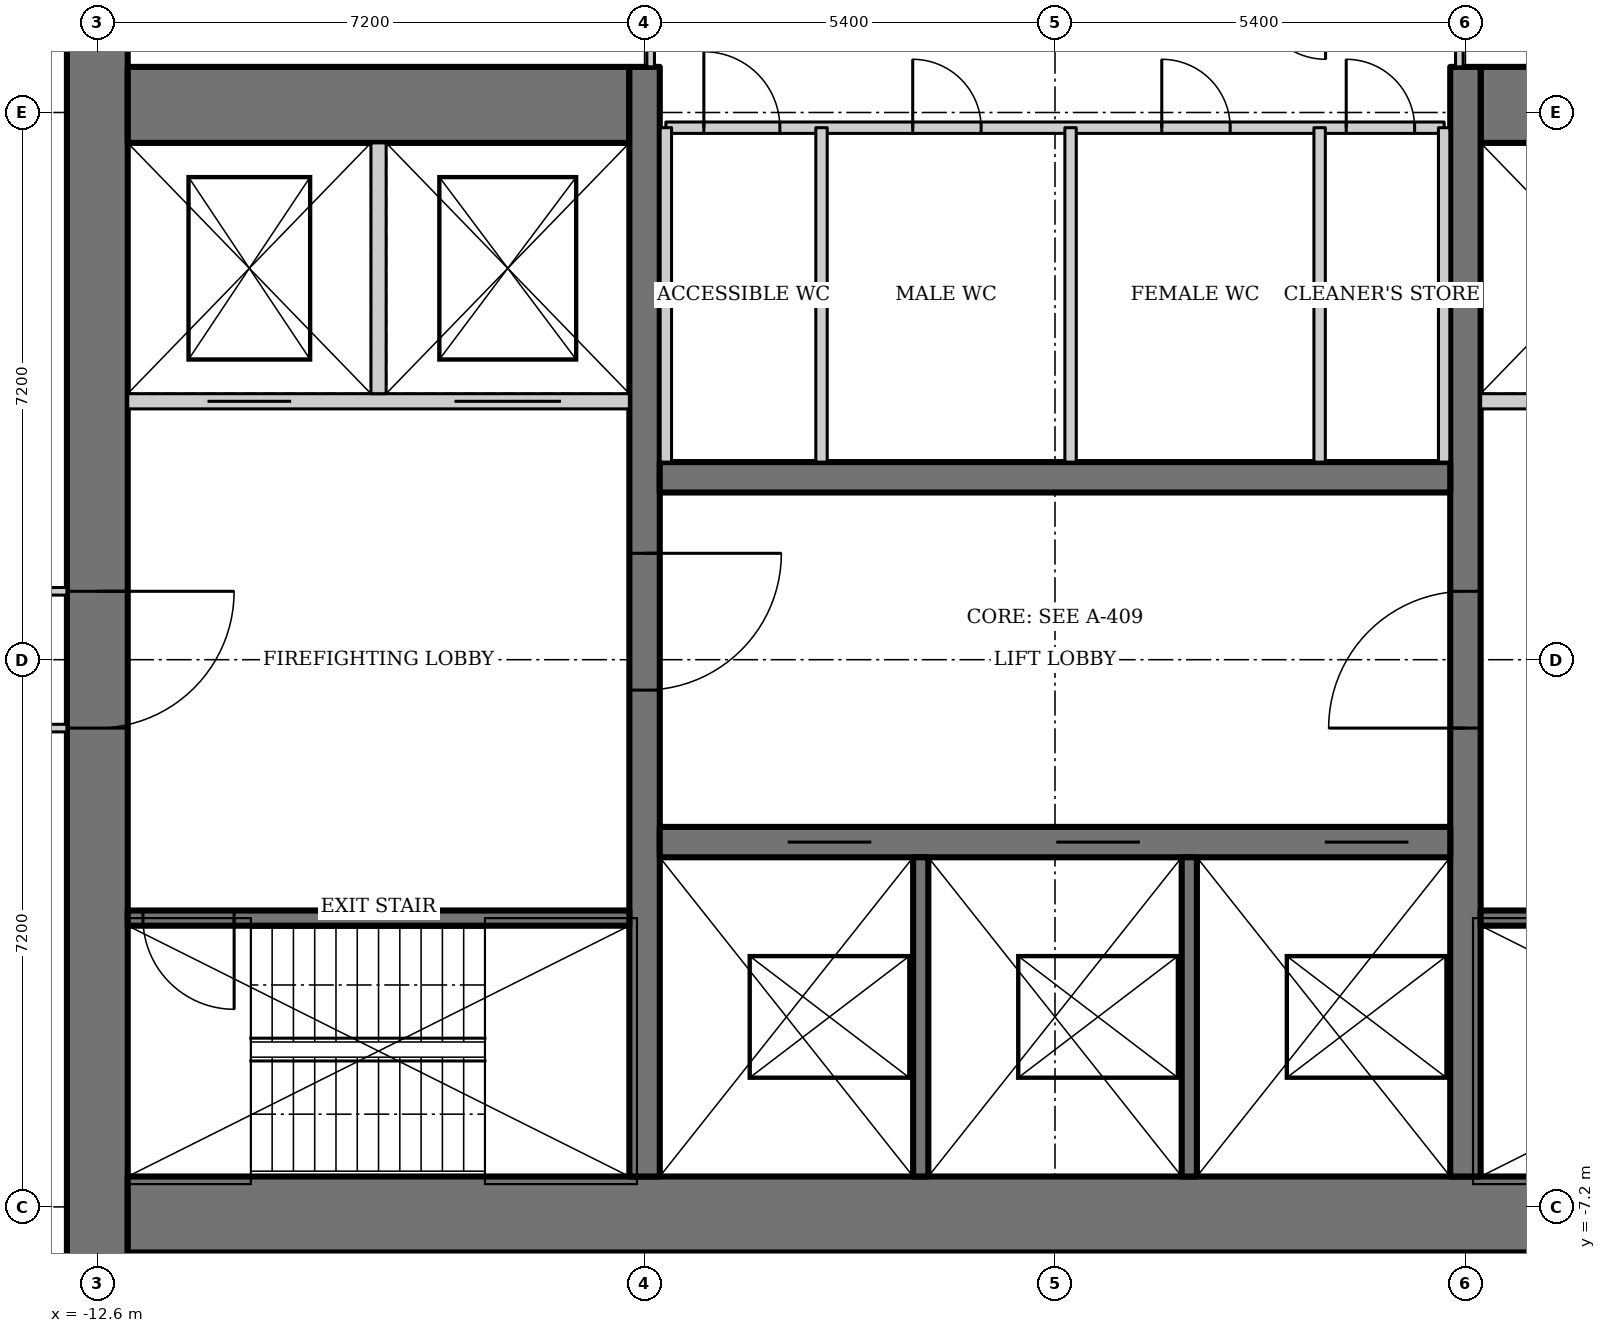
"""IFC4 building model, lengths in metres.
Left out: names, types, materials, properties, quantities, classifications, styles, units other than length and angle.
Written with IfcOpenShell. Run it as: python <this file> out.ifc"""

import sys

from ifc_helpers import new_model, si_unit, direction, frame, frame_2d, origin, place, context, subcontext, project, spatial, rectangle, extrude, element, fill, save


model = new_model("IFC4")
c1 = context("Model", 3, precision=1e-05, world=origin(), true_north=direction((0.0, 1.0)))
c2 = subcontext(c1, "Body", "Model", "MODEL_VIEW")
j1 = project(units=[si_unit("LENGTHUNIT", "METRE"), si_unit("PLANEANGLEUNIT", "RADIAN")], contexts=[c1])
p1 = place(None, origin())
s1 = spatial("IfcSite", under=j1, at=p1, CompositionType="ELEMENT")
p2 = place(p1, origin())
s2 = spatial("IfcBuilding", under=s1, at=p2, CompositionType="ELEMENT")
p3 = place(p2, frame((0.0, 0.0, 241.0)))
s3 = spatial("IfcBuildingStorey", under=s2, at=p3, CompositionType="ELEMENT", Elevation=241.0)
p4 = place(p3, frame((-12.6, 11.0, 0.0), z_axis=(0.0, 0.0, 1.0), x_axis=(0.0, -1.0, 0.0)))
e1 = element("IfcWall", 1, at=p4, inside=s3, PredefinedType="SHEAR", context=c2, shape_type="SweptSolid", body=[
    extrude(rectangle(XDim=22.0, YDim=0.8, at=frame_2d((11.0, 0.0))), origin(), (0.0, 0.0, 1.0), 4.2),
])
p5 = place(p4, frame((10.1, 0.0, 0.0)))
e2 = element("IfcOpeningElement", 2, at=p5, cuts=e1, PredefinedType="OPENING", context=c2, shape_type="SweptSolid", body=[
    extrude(rectangle(XDim=1.8, YDim=2.1, at=frame_2d((0.9, 1.05))), frame((0.0, 0.41, 0.0), z_axis=(0.0, -1.0, 0.0), x_axis=(1.0, 0.0, 0.0)), (0.0, 0.0, 1.0), 0.82),
])
p6 = place(p3, frame((-12.2, -7.3, 0.0), z_axis=(0.0, 0.0, 1.0), x_axis=(1.0, 0.0, 0.0)))
e3 = element("IfcWall", 3, at=p6, inside=s3, PredefinedType="SHEAR", context=c2, shape_type="SweptSolid", body=[
    extrude(rectangle(XDim=24.4, YDim=1.0, at=frame_2d((12.2, 0.0))), origin(), (0.0, 0.0, 1.0), 4.2),
])
for number, where, z_axis, x_axis in (
    (4, (12.2, 7.3, 0.0), (0.0, 0.0, 1.0), (-1.0, 0.0, 0.0)),
    (5, (-5.6, 7.3, 0.0), (0.0, 0.0, 1.0), (-1.0, 0.0, 0.0)),
):
    element("IfcWall", number, at=place(p3, frame(where, z_axis=z_axis, x_axis=x_axis)), inside=s3, PredefinedType="SHEAR", context=c2, shape_type="SweptSolid", body=[
        extrude(rectangle(XDim=6.6, YDim=1.0, at=frame_2d((3.3, 0.0))), origin(), (0.0, 0.0, 1.0), 4.2),
    ])
p7 = place(p3, frame((5.4, -6.8, 0.0), z_axis=(0.0, 0.0, 1.0), x_axis=(0.0, 1.0, 0.0)))
e6 = element("IfcWall", 6, at=p7, inside=s3, PredefinedType="SHEAR", context=c2, shape_type="SweptSolid", body=[
    extrude(rectangle(XDim=14.6, YDim=0.4, at=frame_2d((7.3, 0.0))), origin(), (0.0, 0.0, 1.0), 4.2),
])
p8 = place(p7, frame((5.9, 0.0, 0.0)))
e7 = element("IfcOpeningElement", 7, at=p8, cuts=e6, PredefinedType="OPENING", context=c2, shape_type="SweptSolid", body=[
    extrude(rectangle(XDim=1.8, YDim=2.1, at=frame_2d((0.9, 1.05))), frame((0.0, 0.21, 0.0), z_axis=(0.0, -1.0, 0.0), x_axis=(1.0, 0.0, 0.0)), (0.0, 0.0, 1.0), 0.42),
])
p9 = place(p3, frame((-5.4, 7.8, 0.0), z_axis=(0.0, 0.0, 1.0), x_axis=(0.0, -1.0, 0.0)))
e8 = element("IfcWall", 8, at=p9, inside=s3, PredefinedType="SHEAR", context=c2, shape_type="SweptSolid", body=[
    extrude(rectangle(XDim=14.6, YDim=0.4, at=frame_2d((7.3, 0.0))), origin(), (0.0, 0.0, 1.0), 4.2),
])
p10 = place(p9, frame((6.4, 0.0, 0.0)))
e9 = element("IfcOpeningElement", 9, at=p10, cuts=e8, PredefinedType="OPENING", context=c2, shape_type="SweptSolid", body=[
    extrude(rectangle(XDim=1.8, YDim=2.1, at=frame_2d((0.9, 1.05))), frame((0.0, 0.21, 0.0), z_axis=(0.0, -1.0, 0.0), x_axis=(1.0, 0.0, 0.0)), (0.0, 0.0, 1.0), 0.42),
])
p11 = place(p3, frame((-5.2, -2.4, 0.0), z_axis=(0.0, 0.0, 1.0), x_axis=(1.0, 0.0, 0.0)))
e10 = element("IfcWall", 10, at=p11, inside=s3, PredefinedType="SHEAR", context=c2, shape_type="SweptSolid", body=[
    extrude(rectangle(XDim=10.4, YDim=0.4, at=frame_2d((5.2, 0.0))), origin(), (0.0, 0.0, 1.0), 4.2),
])
p12 = place(p11, frame((1.683, 0.0, 0.0)))
e11 = element("IfcOpeningElement", 11, at=p12, cuts=e10, PredefinedType="OPENING", context=c2, shape_type="SweptSolid", body=[
    extrude(rectangle(XDim=1.1, YDim=2.2, at=frame_2d((0.55, 1.1))), frame((0.0, 0.21, 0.0), z_axis=(0.0, -1.0, 0.0), x_axis=(1.0, 0.0, 0.0)), (0.0, 0.0, 1.0), 0.42),
])
p13 = place(p11, frame((5.217, 0.0, 0.0)))
e12 = element("IfcOpeningElement", 12, at=p13, cuts=e10, PredefinedType="OPENING", context=c2, shape_type="SweptSolid", body=[
    extrude(rectangle(XDim=1.1, YDim=2.2, at=frame_2d((0.55, 1.1))), frame((0.0, 0.21, 0.0), z_axis=(0.0, -1.0, 0.0), x_axis=(1.0, 0.0, 0.0)), (0.0, 0.0, 1.0), 0.42),
])
p14 = place(p11, frame((8.75, 0.0, 0.0)))
e13 = element("IfcOpeningElement", 13, at=p14, cuts=e10, PredefinedType="OPENING", context=c2, shape_type="SweptSolid", body=[
    extrude(rectangle(XDim=1.1, YDim=2.2, at=frame_2d((0.55, 1.1))), frame((0.0, 0.21, 0.0), z_axis=(0.0, -1.0, 0.0), x_axis=(1.0, 0.0, 0.0)), (0.0, 0.0, 1.0), 0.42),
])
for number, where, z_axis, x_axis in (
    (14, (-1.767, -2.6, 0.0), (0.0, 0.0, 1.0), (0.0, -1.0, 0.0)),
    (15, (1.767, -2.6, 0.0), (0.0, 0.0, 1.0), (0.0, -1.0, 0.0)),
):
    element("IfcWall", number, at=place(p3, frame(where, z_axis=z_axis, x_axis=x_axis)), inside=s3, PredefinedType="SOLIDWALL", context=c2, shape_type="SweptSolid", body=[
        extrude(rectangle(XDim=4.2, YDim=0.2, at=frame_2d((2.1, 0.0))), origin(), (0.0, 0.0, 1.0), 4.2),
    ])
p15 = place(p3, frame((5.2, 2.4, 0.0), z_axis=(0.0, 0.0, 1.0), x_axis=(-1.0, 0.0, 0.0)))
e16 = element("IfcWall", 16, at=p15, inside=s3, PredefinedType="SHEAR", context=c2, shape_type="SweptSolid", body=[
    extrude(rectangle(XDim=10.4, YDim=0.4, at=frame_2d((5.2, 0.0))), origin(), (0.0, 0.0, 1.0), 4.2),
])
p16 = place(p3, frame((5.6, -3.4, 0.0), z_axis=(0.0, 0.0, 1.0), x_axis=(1.0, 0.0, 0.0)))
e17 = element("IfcWall", 17, at=p16, inside=s3, PredefinedType="SHEAR", context=c2, shape_type="SweptSolid", body=[
    extrude(rectangle(XDim=6.6, YDim=0.2, at=frame_2d((3.3, 0.0))), origin(), (0.0, 0.0, 1.0), 4.2),
])
p17 = place(p16, frame((5.2, 0.0, 0.0)))
e18 = element("IfcOpeningElement", 18, at=p17, cuts=e17, PredefinedType="OPENING", context=c2, shape_type="SweptSolid", body=[
    extrude(rectangle(XDim=1.2, YDim=2.1, at=frame_2d((0.6, 1.05))), frame((0.0, 0.11, 0.0), z_axis=(0.0, -1.0, 0.0), x_axis=(1.0, 0.0, 0.0)), (0.0, 0.0, 1.0), 0.22),
])
p18 = place(p3, frame((12.2, 3.4, 0.0), z_axis=(0.0, 0.0, 1.0), x_axis=(-1.0, 0.0, 0.0)))
e19 = element("IfcWall", 19, at=p18, inside=s3, PredefinedType="SOLIDWALL", context=c2, shape_type="SweptSolid", body=[
    extrude(rectangle(XDim=6.6, YDim=0.2, at=frame_2d((3.3, 0.0))), origin(), (0.0, 0.0, 1.0), 4.2),
])
p19 = place(p18, frame((4.45, 0.0, 0.0)))
e20 = element("IfcOpeningElement", 20, at=p19, cuts=e19, PredefinedType="OPENING", context=c2, shape_type="SweptSolid", body=[
    extrude(rectangle(XDim=1.1, YDim=2.2, at=frame_2d((0.55, 1.1))), frame((0.0, 0.11, 0.0), z_axis=(0.0, -1.0, 0.0), x_axis=(1.0, 0.0, 0.0)), (0.0, 0.0, 1.0), 0.22),
])
p20 = place(p18, frame((0.9, 0.0, 0.0)))
e21 = element("IfcOpeningElement", 21, at=p20, cuts=e19, PredefinedType="OPENING", context=c2, shape_type="SweptSolid", body=[
    extrude(rectangle(XDim=1.4, YDim=2.2, at=frame_2d((0.7, 1.1))), frame((0.0, 0.11, 0.0), z_axis=(0.0, -1.0, 0.0), x_axis=(1.0, 0.0, 0.0)), (0.0, 0.0, 1.0), 0.22),
])
p21 = place(p3, frame((-5.6, -3.4, 0.0), z_axis=(0.0, 0.0, 1.0), x_axis=(-1.0, 0.0, 0.0)))
e22 = element("IfcWall", 22, at=p21, inside=s3, PredefinedType="SHEAR", context=c2, shape_type="SweptSolid", body=[
    extrude(rectangle(XDim=6.6, YDim=0.2, at=frame_2d((3.3, 0.0))), origin(), (0.0, 0.0, 1.0), 4.2),
])
p22 = place(p21, frame((5.2, 0.0, 0.0)))
e23 = element("IfcOpeningElement", 23, at=p22, cuts=e22, PredefinedType="OPENING", context=c2, shape_type="SweptSolid", body=[
    extrude(rectangle(XDim=1.2, YDim=2.1, at=frame_2d((0.6, 1.05))), frame((0.0, 0.11, 0.0), z_axis=(0.0, -1.0, 0.0), x_axis=(1.0, 0.0, 0.0)), (0.0, 0.0, 1.0), 0.22),
])
p23 = place(p3, frame((-12.2, 3.4, 0.0), z_axis=(0.0, 0.0, 1.0), x_axis=(1.0, 0.0, 0.0)))
e24 = element("IfcWall", 24, at=p23, inside=s3, PredefinedType="SOLIDWALL", context=c2, shape_type="SweptSolid", body=[
    extrude(rectangle(XDim=6.6, YDim=0.2, at=frame_2d((3.3, 0.0))), origin(), (0.0, 0.0, 1.0), 4.2),
])
p24 = place(p23, frame((1.05, 0.0, 0.0)))
e25 = element("IfcOpeningElement", 25, at=p24, cuts=e24, PredefinedType="OPENING", context=c2, shape_type="SweptSolid", body=[
    extrude(rectangle(XDim=1.1, YDim=2.2, at=frame_2d((0.55, 1.1))), frame((0.0, 0.11, 0.0), z_axis=(0.0, -1.0, 0.0), x_axis=(1.0, 0.0, 0.0)), (0.0, 0.0, 1.0), 0.22),
])
p25 = place(p23, frame((4.3, 0.0, 0.0)))
e26 = element("IfcOpeningElement", 26, at=p25, cuts=e24, PredefinedType="OPENING", context=c2, shape_type="SweptSolid", body=[
    extrude(rectangle(XDim=1.4, YDim=2.2, at=frame_2d((0.7, 1.1))), frame((0.0, 0.11, 0.0), z_axis=(0.0, -1.0, 0.0), x_axis=(1.0, 0.0, 0.0)), (0.0, 0.0, 1.0), 0.22),
])
p26 = place(p3, frame((-8.9, 3.5, 0.0), z_axis=(0.0, 0.0, 1.0), x_axis=(0.0, 1.0, 0.0)))
e27 = element("IfcWall", 27, at=p26, inside=s3, PredefinedType="SOLIDWALL", context=c2, shape_type="SweptSolid", body=[
    extrude(rectangle(XDim=3.3, YDim=0.2, at=frame_2d((1.65, 0.0))), origin(), (0.0, 0.0, 1.0), 4.2),
])
p27 = place(p3, frame((-5.12, 7.0, 0.0), z_axis=(0.0, 0.0, 1.0), x_axis=(1.0, 0.0, 0.0)))
e28 = element("IfcWall", 28, at=p27, inside=s3, PredefinedType="SOLIDWALL", context=c2, shape_type="SweptSolid", body=[
    extrude(rectangle(XDim=10.24, YDim=0.15, at=frame_2d((5.12, 0.0))), origin(), (0.0, 0.0, 1.0), 4.05),
])
p28 = place(p27, frame((0.5, 0.0, 0.0)))
e29 = element("IfcOpeningElement", 29, at=p28, cuts=e28, PredefinedType="OPENING", context=c2, shape_type="SweptSolid", body=[
    extrude(rectangle(XDim=1.0, YDim=2.1, at=frame_2d((0.5, 1.05))), frame((0.0, 0.085, 0.0), z_axis=(0.0, -1.0, 0.0), x_axis=(1.0, 0.0, 0.0)), (0.0, 0.0, 1.0), 0.17),
])
p29 = place(p27, frame((3.248, 0.0, 0.0)))
e30 = element("IfcOpeningElement", 30, at=p29, cuts=e28, PredefinedType="OPENING", context=c2, shape_type="SweptSolid", body=[
    extrude(rectangle(XDim=0.9, YDim=2.1, at=frame_2d((0.45, 1.05))), frame((0.0, 0.085, 0.0), z_axis=(0.0, -1.0, 0.0), x_axis=(1.0, 0.0, 0.0)), (0.0, 0.0, 1.0), 0.17),
])
p30 = place(p27, frame((6.525, 0.0, 0.0)))
e31 = element("IfcOpeningElement", 31, at=p30, cuts=e28, PredefinedType="OPENING", context=c2, shape_type="SweptSolid", body=[
    extrude(rectangle(XDim=0.9, YDim=2.1, at=frame_2d((0.45, 1.05))), frame((0.0, 0.085, 0.0), z_axis=(0.0, -1.0, 0.0), x_axis=(1.0, 0.0, 0.0)), (0.0, 0.0, 1.0), 0.17),
])
p31 = place(p27, frame((8.952, 0.0, 0.0)))
e32 = element("IfcOpeningElement", 32, at=p31, cuts=e28, PredefinedType="OPENING", context=c2, shape_type="SweptSolid", body=[
    extrude(rectangle(XDim=0.9, YDim=2.1, at=frame_2d((0.45, 1.05))), frame((0.0, 0.085, 0.0), z_axis=(0.0, -1.0, 0.0), x_axis=(1.0, 0.0, 0.0)), (0.0, 0.0, 1.0), 0.17),
])
for number, where, z_axis, x_axis in (
    (33, (-5.12, 2.6, 0.0), (0.0, 0.0, 1.0), (0.0, 1.0, 0.0)),
    (34, (5.12, 2.6, 0.0), (0.0, 0.0, 1.0), (0.0, 1.0, 0.0)),
    (35, (-3.072, 2.6, 0.0), (0.0, 0.0, 1.0), (0.0, 1.0, 0.0)),
    (36, (0.205, 2.6, 0.0), (0.0, 0.0, 1.0), (0.0, 1.0, 0.0)),
    (37, (3.482, 2.6, 0.0), (0.0, 0.0, 1.0), (0.0, 1.0, 0.0)),
):
    element("IfcWall", number, at=place(p3, frame(where, z_axis=z_axis, x_axis=x_axis)), inside=s3, PredefinedType="SOLIDWALL", context=c2, shape_type="SweptSolid", body=[
        extrude(rectangle(XDim=4.4, YDim=0.15, at=frame_2d((2.2, 0.0))), origin(), (0.0, 0.0, 1.0), 4.05),
    ])
for number, where, z_axis, x_axis in (
    (38, (5.32, 7.8, 0.0), (0.0, 0.0, 1.0), (0.0, 1.0, 0.0)),
    (39, (-5.32, 8.8, 0.0), (0.0, 0.0, 1.0), (0.0, -1.0, 0.0)),
):
    element("IfcWall", number, at=place(p3, frame(where, z_axis=z_axis, x_axis=x_axis)), inside=s3, PredefinedType="PARTITIONING", context=c2, shape_type="SweptSolid", body=[
        extrude(rectangle(XDim=1.0, YDim=0.1, at=frame_2d((0.5, 0.0))), origin(), (0.0, 0.0, 1.0), 4.05),
    ])
p32 = place(p3, frame((-15.165, -0.9, 0.0), z_axis=(0.0, 0.0, 1.0), x_axis=(1.0, 0.0, 0.0)))
e40 = element("IfcWall", 40, at=p32, inside=s3, PredefinedType="PARTITIONING", context=c2, shape_type="SweptSolid", body=[
    extrude(rectangle(XDim=2.165, YDim=0.1, at=frame_2d((1.083, 0.0))), origin(), (0.0, 0.0, 1.0), 4.05),
])
p33 = place(p32, frame((0.1, 0.0, 0.0)))
e41 = element("IfcOpeningElement", 41, at=p33, cuts=e40, PredefinedType="OPENING", context=c2, shape_type="SweptSolid", body=[
    extrude(rectangle(XDim=0.9, YDim=2.1, at=frame_2d((0.45, 1.05))), frame((0.0, 0.06, 0.0), z_axis=(0.0, -1.0, 0.0), x_axis=(1.0, 0.0, 0.0)), (0.0, 0.0, 1.0), 0.12),
])
p34 = place(p3, frame((-13.0, 0.9, 0.0), z_axis=(0.0, 0.0, 1.0), x_axis=(-1.0, 0.0, 0.0)))
e42 = element("IfcWall", 42, at=p34, inside=s3, PredefinedType="PARTITIONING", context=c2, shape_type="SweptSolid", body=[
    extrude(rectangle(XDim=2.165, YDim=0.1, at=frame_2d((1.083, 0.0))), origin(), (0.0, 0.0, 1.0), 4.05),
])
p35 = place(p34, frame((1.15, 0.0, 0.0)))
e43 = element("IfcOpeningElement", 43, at=p35, cuts=e42, PredefinedType="OPENING", context=c2, shape_type="SweptSolid", body=[
    extrude(rectangle(XDim=0.9, YDim=2.1, at=frame_2d((0.45, 1.05))), frame((0.0, 0.06, 0.0), z_axis=(0.0, -1.0, 0.0), x_axis=(1.0, 0.0, 0.0)), (0.0, 0.0, 1.0), 0.12),
])
p36 = place(p8, origin())
e44 = element("IfcDoor", 44, at=p36, inside=s3, OperationType="DOUBLE_DOOR_DOUBLE_SWING", PredefinedType="DOOR", context=c2, shape_type="SweptSolid", body=[
    extrude(rectangle(XDim=1.8, YDim=2.1, at=frame_2d((0.9, 1.05))), frame((0.0, 0.025, 0.0), z_axis=(0.0, -1.0, 0.0), x_axis=(1.0, 0.0, 0.0)), (0.0, 0.0, 1.0), 0.05),
])
fill(e7, e44)
p37 = place(p10, origin())
e45 = element("IfcDoor", 45, at=p37, inside=s3, OperationType="DOUBLE_DOOR_DOUBLE_SWING", PredefinedType="DOOR", context=c2, shape_type="SweptSolid", body=[
    extrude(rectangle(XDim=1.8, YDim=2.1, at=frame_2d((0.9, 1.05))), frame((0.0, 0.025, 0.0), z_axis=(0.0, -1.0, 0.0), x_axis=(1.0, 0.0, 0.0)), (0.0, 0.0, 1.0), 0.05),
])
fill(e9, e45)
p38 = place(p22, origin())
e46 = element("IfcDoor", 46, at=p38, inside=s3, OperationType="SINGLE_SWING_RIGHT", PredefinedType="DOOR", context=c2, shape_type="SweptSolid", body=[
    extrude(rectangle(XDim=1.2, YDim=2.1, at=frame_2d((0.6, 1.05))), frame((0.0, 0.025, 0.0), z_axis=(0.0, -1.0, 0.0), x_axis=(1.0, 0.0, 0.0)), (0.0, 0.0, 1.0), 0.05),
])
fill(e23, e46)
p39 = place(p5, origin())
e47 = element("IfcDoor", 47, at=p39, inside=s3, OperationType="DOUBLE_DOOR_DOUBLE_SWING", PredefinedType="DOOR", context=c2, shape_type="SweptSolid", body=[
    extrude(rectangle(XDim=1.8, YDim=2.1, at=frame_2d((0.9, 1.05))), frame((0.0, 0.025, 0.0), z_axis=(0.0, -1.0, 0.0), x_axis=(1.0, 0.0, 0.0)), (0.0, 0.0, 1.0), 0.05),
])
fill(e2, e47)
p40 = place(p12, origin())
e48 = element("IfcDoor", 48, at=p40, inside=s3, OperationType="DOUBLE_DOOR_SLIDING", PredefinedType="DOOR", context=c2, shape_type="SweptSolid", body=[
    extrude(rectangle(XDim=1.1, YDim=2.2, at=frame_2d((0.55, 1.1))), frame((0.0, 0.025, 0.0), z_axis=(0.0, -1.0, 0.0), x_axis=(1.0, 0.0, 0.0)), (0.0, 0.0, 1.0), 0.05),
])
fill(e11, e48)
p41 = place(p13, origin())
e49 = element("IfcDoor", 49, at=p41, inside=s3, OperationType="DOUBLE_DOOR_SLIDING", PredefinedType="DOOR", context=c2, shape_type="SweptSolid", body=[
    extrude(rectangle(XDim=1.1, YDim=2.2, at=frame_2d((0.55, 1.1))), frame((0.0, 0.025, 0.0), z_axis=(0.0, -1.0, 0.0), x_axis=(1.0, 0.0, 0.0)), (0.0, 0.0, 1.0), 0.05),
])
fill(e12, e49)
p42 = place(p14, origin())
e50 = element("IfcDoor", 50, at=p42, inside=s3, OperationType="DOUBLE_DOOR_SLIDING", PredefinedType="DOOR", context=c2, shape_type="SweptSolid", body=[
    extrude(rectangle(XDim=1.1, YDim=2.2, at=frame_2d((0.55, 1.1))), frame((0.0, 0.025, 0.0), z_axis=(0.0, -1.0, 0.0), x_axis=(1.0, 0.0, 0.0)), (0.0, 0.0, 1.0), 0.05),
])
fill(e13, e50)
p43 = place(p24, origin())
e51 = element("IfcDoor", 51, at=p43, inside=s3, OperationType="DOUBLE_DOOR_SLIDING", PredefinedType="DOOR", context=c2, shape_type="SweptSolid", body=[
    extrude(rectangle(XDim=1.1, YDim=2.2, at=frame_2d((0.55, 1.1))), frame((0.0, 0.025, 0.0), z_axis=(0.0, -1.0, 0.0), x_axis=(1.0, 0.0, 0.0)), (0.0, 0.0, 1.0), 0.05),
])
fill(e25, e51)
p44 = place(p25, origin())
e52 = element("IfcDoor", 52, at=p44, inside=s3, OperationType="DOUBLE_DOOR_SLIDING", PredefinedType="DOOR", context=c2, shape_type="SweptSolid", body=[
    extrude(rectangle(XDim=1.4, YDim=2.2, at=frame_2d((0.7, 1.1))), frame((0.0, 0.025, 0.0), z_axis=(0.0, -1.0, 0.0), x_axis=(1.0, 0.0, 0.0)), (0.0, 0.0, 1.0), 0.05),
])
fill(e26, e52)
p45 = place(p28, origin())
e53 = element("IfcDoor", 53, at=p45, inside=s3, OperationType="SINGLE_SWING_LEFT", PredefinedType="DOOR", context=c2, shape_type="SweptSolid", body=[
    extrude(rectangle(XDim=1.0, YDim=2.1, at=frame_2d((0.5, 1.05))), frame((0.0, 0.025, 0.0), z_axis=(0.0, -1.0, 0.0), x_axis=(1.0, 0.0, 0.0)), (0.0, 0.0, 1.0), 0.05),
])
fill(e29, e53)
p46 = place(p29, origin())
e54 = element("IfcDoor", 54, at=p46, inside=s3, OperationType="SINGLE_SWING_LEFT", PredefinedType="DOOR", context=c2, shape_type="SweptSolid", body=[
    extrude(rectangle(XDim=0.9, YDim=2.1, at=frame_2d((0.45, 1.05))), frame((0.0, 0.025, 0.0), z_axis=(0.0, -1.0, 0.0), x_axis=(1.0, 0.0, 0.0)), (0.0, 0.0, 1.0), 0.05),
])
fill(e30, e54)
p47 = place(p30, origin())
e55 = element("IfcDoor", 55, at=p47, inside=s3, OperationType="SINGLE_SWING_LEFT", PredefinedType="DOOR", context=c2, shape_type="SweptSolid", body=[
    extrude(rectangle(XDim=0.9, YDim=2.1, at=frame_2d((0.45, 1.05))), frame((0.0, 0.025, 0.0), z_axis=(0.0, -1.0, 0.0), x_axis=(1.0, 0.0, 0.0)), (0.0, 0.0, 1.0), 0.05),
])
fill(e31, e55)
p48 = place(p31, origin())
e56 = element("IfcDoor", 56, at=p48, inside=s3, OperationType="SINGLE_SWING_LEFT", PredefinedType="DOOR", context=c2, shape_type="SweptSolid", body=[
    extrude(rectangle(XDim=0.9, YDim=2.1, at=frame_2d((0.45, 1.05))), frame((0.0, 0.025, 0.0), z_axis=(0.0, -1.0, 0.0), x_axis=(1.0, 0.0, 0.0)), (0.0, 0.0, 1.0), 0.05),
])
fill(e32, e56)
save(model, sys.argv[1])
